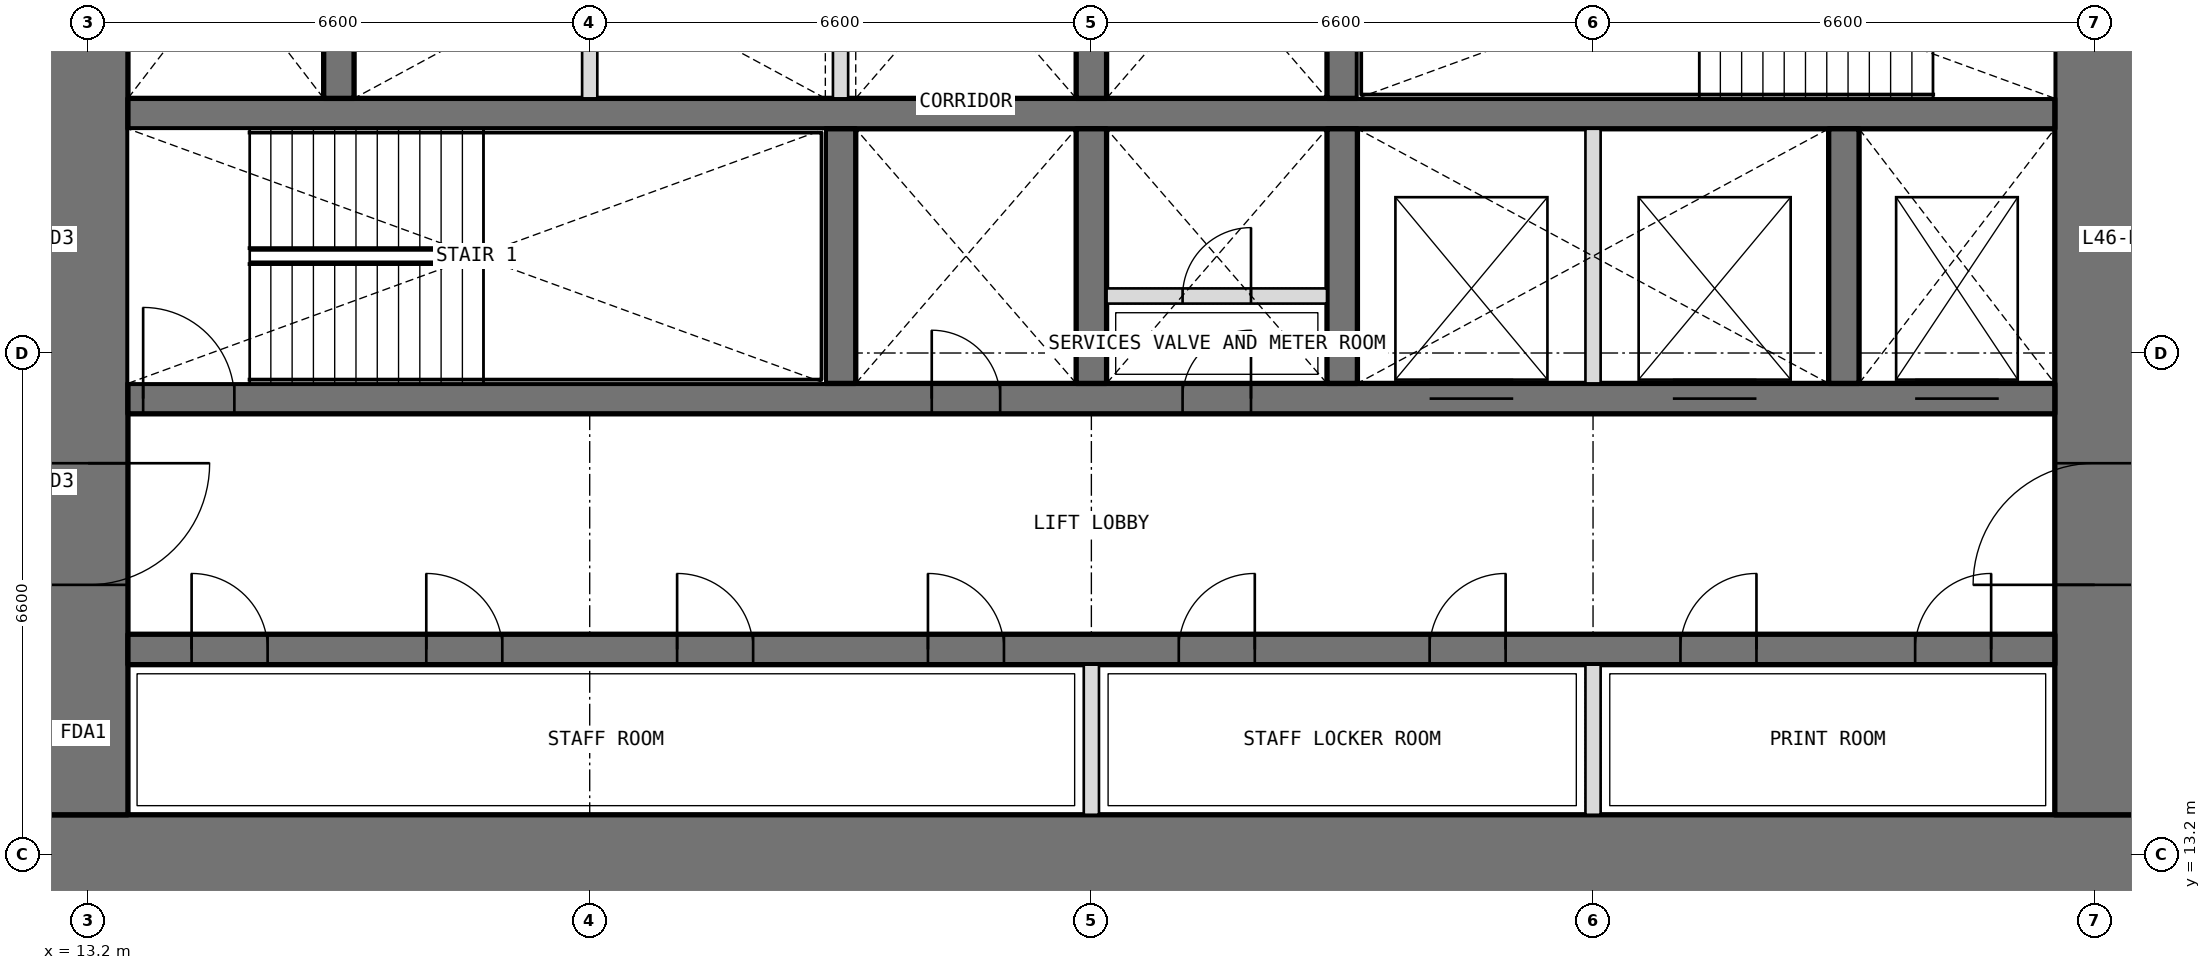
"""IFC4 building model, lengths in metres.
Left out: names, types, materials, properties, quantities, classifications, styles, units other than length and angle.
Written with IfcOpenShell. Run it as: python <this file> out.ifc"""

import sys

from ifc_helpers import new_model, si_unit, direction, frame, frame_2d, origin, place, context, subcontext, project, spatial, rectangle, extrude, element, fill, save


model = new_model("IFC4")
c1 = context("Model", 3, precision=1e-05, world=origin(), true_north=direction((0.0, 1.0)))
c2 = subcontext(c1, "Body", "Model", "MODEL_VIEW")
j1 = project(units=[si_unit("LENGTHUNIT", "METRE"), si_unit("PLANEANGLEUNIT", "RADIAN")], contexts=[c1])
p1 = place(None, origin())
s1 = spatial("IfcSite", under=j1, at=p1, CompositionType="ELEMENT")
p2 = place(p1, origin())
s2 = spatial("IfcBuilding", under=s1, at=p2, CompositionType="ELEMENT")
p3 = place(p2, frame((0.0, 0.0, 201.9)))
s3 = spatial("IfcBuildingStorey", under=s2, at=p3, CompositionType="ELEMENT", Elevation=201.9)
p4 = place(p3, frame((12.675, 13.2, 0.0), z_axis=(0.0, 0.0, 1.0), x_axis=(1.0, 0.0, 0.0)))
e1 = element("IfcWall", 1, at=p4, inside=s3, PredefinedType="SHEAR", context=c2, shape_type="SweptSolid", body=[
    extrude(rectangle(XDim=27.45, YDim=1.05, at=frame_2d((13.725, 0.0))), origin(), (0.0, 0.0, 1.0), 4.2),
])
p5 = place(p3, frame((39.6, 13.725, 0.0), z_axis=(0.0, 0.0, 1.0), x_axis=(0.0, 1.0, 0.0)))
e2 = element("IfcWall", 2, at=p5, inside=s3, PredefinedType="SHEAR", context=c2, shape_type="SweptSolid", body=[
    extrude(rectangle(XDim=18.75, YDim=1.05, at=frame_2d((9.375, 0.0))), origin(), (0.0, 0.0, 1.0), 4.2),
])
p6 = place(p5, frame((3.025, 0.0, 0.0)))
e3 = element("IfcOpeningElement", 3, at=p6, cuts=e2, PredefinedType="OPENING", context=c2, shape_type="SweptSolid", body=[
    extrude(rectangle(XDim=1.6, YDim=2.1, at=frame_2d((0.8, 1.05))), frame((0.0, 0.535, 0.0), z_axis=(0.0, -1.0, 0.0), x_axis=(1.0, 0.0, 0.0)), (0.0, 0.0, 1.0), 1.07),
])
p7 = place(p5, frame((13.825, 0.0, 0.0)))
e4 = element("IfcOpeningElement", 4, at=p7, cuts=e2, PredefinedType="OPENING", context=c2, shape_type="SweptSolid", body=[
    extrude(rectangle(XDim=1.6, YDim=2.1, at=frame_2d((0.8, 1.05))), frame((0.0, 0.535, 0.0), z_axis=(0.0, -1.0, 0.0), x_axis=(1.0, 0.0, 0.0)), (0.0, 0.0, 1.0), 1.07),
])
p8 = place(p3, frame((13.2, 32.475, 0.0), z_axis=(0.0, 0.0, 1.0), x_axis=(0.0, -1.0, 0.0)))
e5 = element("IfcWall", 5, at=p8, inside=s3, PredefinedType="SHEAR", context=c2, shape_type="SweptSolid", body=[
    extrude(rectangle(XDim=18.75, YDim=1.05, at=frame_2d((9.375, 0.0))), origin(), (0.0, 0.0, 1.0), 4.2),
])
p9 = place(p8, frame((14.125, 0.0, 0.0)))
e6 = element("IfcOpeningElement", 6, at=p9, cuts=e5, PredefinedType="OPENING", context=c2, shape_type="SweptSolid", body=[
    extrude(rectangle(XDim=1.6, YDim=2.1, at=frame_2d((0.8, 1.05))), frame((0.0, 0.535, 0.0), z_axis=(0.0, -1.0, 0.0), x_axis=(1.0, 0.0, 0.0)), (0.0, 0.0, 1.0), 1.07),
])
p10 = place(p8, frame((3.325, 0.0, 0.0)))
e7 = element("IfcOpeningElement", 7, at=p10, cuts=e5, PredefinedType="OPENING", context=c2, shape_type="SweptSolid", body=[
    extrude(rectangle(XDim=1.6, YDim=2.1, at=frame_2d((0.8, 1.05))), frame((0.0, 0.535, 0.0), z_axis=(0.0, -1.0, 0.0), x_axis=(1.0, 0.0, 0.0)), (0.0, 0.0, 1.0), 1.07),
])
p11 = place(p3, frame((13.725, 15.9, 0.0), z_axis=(0.0, 0.0, 1.0), x_axis=(1.0, 0.0, 0.0)))
e8 = element("IfcWall", 8, at=p11, inside=s3, PredefinedType="SHEAR", context=c2, shape_type="SweptSolid", body=[
    extrude(rectangle(XDim=25.35, YDim=0.4, at=frame_2d((12.675, 0.0))), origin(), (0.0, 0.0, 1.0), 4.2),
])
p12 = place(p11, frame((0.837, 0.0, 0.0)))
e9 = element("IfcOpeningElement", 9, at=p12, cuts=e8, PredefinedType="OPENING", context=c2, shape_type="SweptSolid", body=[
    extrude(rectangle(XDim=1.0, YDim=2.1, at=frame_2d((0.5, 1.05))), frame((0.0, 0.21, 0.0), z_axis=(0.0, -1.0, 0.0), x_axis=(1.0, 0.0, 0.0)), (0.0, 0.0, 1.0), 0.42),
])
p13 = place(p11, frame((3.925, 0.0, 0.0)))
e10 = element("IfcOpeningElement", 10, at=p13, cuts=e8, PredefinedType="OPENING", context=c2, shape_type="SweptSolid", body=[
    extrude(rectangle(XDim=1.0, YDim=2.1, at=frame_2d((0.5, 1.05))), frame((0.0, 0.21, 0.0), z_axis=(0.0, -1.0, 0.0), x_axis=(1.0, 0.0, 0.0)), (0.0, 0.0, 1.0), 0.42),
])
p14 = place(p11, frame((7.225, 0.0, 0.0)))
e11 = element("IfcOpeningElement", 11, at=p14, cuts=e8, PredefinedType="OPENING", context=c2, shape_type="SweptSolid", body=[
    extrude(rectangle(XDim=1.0, YDim=2.1, at=frame_2d((0.5, 1.05))), frame((0.0, 0.21, 0.0), z_axis=(0.0, -1.0, 0.0), x_axis=(1.0, 0.0, 0.0)), (0.0, 0.0, 1.0), 0.42),
])
p15 = place(p11, frame((10.525, 0.0, 0.0)))
e12 = element("IfcOpeningElement", 12, at=p15, cuts=e8, PredefinedType="OPENING", context=c2, shape_type="SweptSolid", body=[
    extrude(rectangle(XDim=1.0, YDim=2.1, at=frame_2d((0.5, 1.05))), frame((0.0, 0.21, 0.0), z_axis=(0.0, -1.0, 0.0), x_axis=(1.0, 0.0, 0.0)), (0.0, 0.0, 1.0), 0.42),
])
p16 = place(p11, frame((13.825, 0.0, 0.0)))
e13 = element("IfcOpeningElement", 13, at=p16, cuts=e8, PredefinedType="OPENING", context=c2, shape_type="SweptSolid", body=[
    extrude(rectangle(XDim=1.0, YDim=2.1, at=frame_2d((0.5, 1.05))), frame((0.0, 0.21, 0.0), z_axis=(0.0, -1.0, 0.0), x_axis=(1.0, 0.0, 0.0)), (0.0, 0.0, 1.0), 0.42),
])
p17 = place(p11, frame((17.125, 0.0, 0.0)))
e14 = element("IfcOpeningElement", 14, at=p17, cuts=e8, PredefinedType="OPENING", context=c2, shape_type="SweptSolid", body=[
    extrude(rectangle(XDim=1.0, YDim=2.1, at=frame_2d((0.5, 1.05))), frame((0.0, 0.21, 0.0), z_axis=(0.0, -1.0, 0.0), x_axis=(1.0, 0.0, 0.0)), (0.0, 0.0, 1.0), 0.42),
])
p18 = place(p11, frame((20.425, 0.0, 0.0)))
e15 = element("IfcOpeningElement", 15, at=p18, cuts=e8, PredefinedType="OPENING", context=c2, shape_type="SweptSolid", body=[
    extrude(rectangle(XDim=1.0, YDim=2.1, at=frame_2d((0.5, 1.05))), frame((0.0, 0.21, 0.0), z_axis=(0.0, -1.0, 0.0), x_axis=(1.0, 0.0, 0.0)), (0.0, 0.0, 1.0), 0.42),
])
p19 = place(p11, frame((23.512, 0.0, 0.0)))
e16 = element("IfcOpeningElement", 16, at=p19, cuts=e8, PredefinedType="OPENING", context=c2, shape_type="SweptSolid", body=[
    extrude(rectangle(XDim=1.0, YDim=2.1, at=frame_2d((0.5, 1.05))), frame((0.0, 0.21, 0.0), z_axis=(0.0, -1.0, 0.0), x_axis=(1.0, 0.0, 0.0)), (0.0, 0.0, 1.0), 0.42),
])
p20 = place(p3, frame((13.725, 19.2, 0.0), z_axis=(0.0, 0.0, 1.0), x_axis=(1.0, 0.0, 0.0)))
e17 = element("IfcWall", 17, at=p20, inside=s3, PredefinedType="SHEAR", context=c2, shape_type="SweptSolid", body=[
    extrude(rectangle(XDim=25.35, YDim=0.4, at=frame_2d((12.675, 0.0))), origin(), (0.0, 0.0, 1.0), 4.2),
])
p21 = place(p20, frame((10.575, 0.0, 0.0)))
e18 = element("IfcOpeningElement", 18, at=p21, cuts=e17, PredefinedType="OPENING", context=c2, shape_type="SweptSolid", body=[
    extrude(rectangle(XDim=0.9, YDim=2.1, at=frame_2d((0.45, 1.05))), frame((0.0, 0.21, 0.0), z_axis=(0.0, -1.0, 0.0), x_axis=(1.0, 0.0, 0.0)), (0.0, 0.0, 1.0), 0.42),
])
p22 = place(p20, frame((13.875, 0.0, 0.0)))
e19 = element("IfcOpeningElement", 19, at=p22, cuts=e17, PredefinedType="OPENING", context=c2, shape_type="SweptSolid", body=[
    extrude(rectangle(XDim=0.9, YDim=2.1, at=frame_2d((0.45, 1.05))), frame((0.0, 0.21, 0.0), z_axis=(0.0, -1.0, 0.0), x_axis=(1.0, 0.0, 0.0)), (0.0, 0.0, 1.0), 0.42),
])
p23 = place(p20, frame((0.2, 0.0, 0.0)))
e20 = element("IfcOpeningElement", 20, at=p23, cuts=e17, PredefinedType="OPENING", context=c2, shape_type="SweptSolid", body=[
    extrude(rectangle(XDim=1.2, YDim=2.1, at=frame_2d((0.6, 1.05))), frame((0.0, 0.21, 0.0), z_axis=(0.0, -1.0, 0.0), x_axis=(1.0, 0.0, 0.0)), (0.0, 0.0, 1.0), 0.42),
])
p24 = place(p20, frame((23.512, 0.0, 0.0)))
e21 = element("IfcOpeningElement", 21, at=p24, cuts=e17, PredefinedType="OPENING", context=c2, shape_type="SweptSolid", body=[
    extrude(rectangle(XDim=1.1, YDim=2.1, at=frame_2d((0.55, 1.05))), frame((0.0, 0.21, 0.0), z_axis=(0.0, -1.0, 0.0), x_axis=(1.0, 0.0, 0.0)), (0.0, 0.0, 1.0), 0.42),
])
p25 = place(p20, frame((17.125, 0.0, 0.0)))
e22 = element("IfcOpeningElement", 22, at=p25, cuts=e17, PredefinedType="OPENING", context=c2, shape_type="SweptSolid", body=[
    extrude(rectangle(XDim=1.1, YDim=2.1, at=frame_2d((0.55, 1.05))), frame((0.0, 0.21, 0.0), z_axis=(0.0, -1.0, 0.0), x_axis=(1.0, 0.0, 0.0)), (0.0, 0.0, 1.0), 0.42),
])
p26 = place(p20, frame((20.325, 0.0, 0.0)))
e23 = element("IfcOpeningElement", 23, at=p26, cuts=e17, PredefinedType="OPENING", context=c2, shape_type="SweptSolid", body=[
    extrude(rectangle(XDim=1.1, YDim=2.1, at=frame_2d((0.55, 1.05))), frame((0.0, 0.21, 0.0), z_axis=(0.0, -1.0, 0.0), x_axis=(1.0, 0.0, 0.0)), (0.0, 0.0, 1.0), 0.42),
])
p27 = place(p3, frame((13.725, 22.95, 0.0), z_axis=(0.0, 0.0, 1.0), x_axis=(1.0, 0.0, 0.0)))
e24 = element("IfcWall", 24, at=p27, inside=s3, PredefinedType="SHEAR", context=c2, shape_type="SweptSolid", body=[
    extrude(rectangle(XDim=25.35, YDim=0.4, at=frame_2d((12.675, 0.0))), origin(), (0.0, 0.0, 1.0), 4.2),
])
for number, where, z_axis, x_axis in (
    (25, (23.1, 19.4, 0.0), (0.0, 0.0, 1.0), (0.0, 1.0, 0.0)),
    (26, (26.4, 19.4, 0.0), (0.0, 0.0, 1.0), (0.0, 1.0, 0.0)),
    (27, (29.7, 19.4, 0.0), (0.0, 0.0, 1.0), (0.0, 1.0, 0.0)),
    (28, (36.3, 19.4, 0.0), (0.0, 0.0, 1.0), (0.0, 1.0, 0.0)),
    (29, (16.5, 23.15, 0.0), (0.0, 0.0, 1.0), (0.0, 1.0, 0.0)),
    (30, (26.4, 23.15, 0.0), (0.0, 0.0, 1.0), (0.0, 1.0, 0.0)),
    (31, (29.7, 23.15, 0.0), (0.0, 0.0, 1.0), (0.0, 1.0, 0.0)),
):
    element("IfcWall", number, at=place(p3, frame(where, z_axis=z_axis, x_axis=x_axis)), inside=s3, PredefinedType="SHEAR", context=c2, shape_type="SweptSolid", body=[
        extrude(rectangle(XDim=3.35, YDim=0.4, at=frame_2d((1.675, 0.0))), origin(), (0.0, 0.0, 1.0), 4.2),
    ])
for number, where, z_axis, x_axis in (
    (32, (26.4, 13.725, 0.0), (0.0, 0.0, 1.0), (0.0, 1.0, 0.0)),
    (33, (33.0, 13.725, 0.0), (0.0, 0.0, 1.0), (0.0, 1.0, 0.0)),
):
    element("IfcWall", number, at=place(p3, frame(where, z_axis=z_axis, x_axis=x_axis)), inside=s3, PredefinedType="PARTITIONING", context=c2, shape_type="SweptSolid", body=[
        extrude(rectangle(XDim=1.975, YDim=0.2, at=frame_2d((0.987, 0.0))), origin(), (0.0, 0.0, 1.0), 4.2),
    ])
for number, where, z_axis, x_axis in (
    (34, (33.0, 19.4, 0.0), (0.0, 0.0, 1.0), (0.0, 1.0, 0.0)),
    (35, (19.8, 23.15, 0.0), (0.0, 0.0, 1.0), (0.0, 1.0, 0.0)),
    (36, (23.1, 23.15, 0.0), (0.0, 0.0, 1.0), (0.0, 1.0, 0.0)),
):
    element("IfcWall", number, at=place(p3, frame(where, z_axis=z_axis, x_axis=x_axis)), inside=s3, PredefinedType="PARTITIONING", context=c2, shape_type="SweptSolid", body=[
        extrude(rectangle(XDim=3.35, YDim=0.2, at=frame_2d((1.675, 0.0))), origin(), (0.0, 0.0, 1.0), 4.2),
    ])
p28 = place(p3, frame((26.6, 20.55, 0.0), z_axis=(0.0, 0.0, 1.0), x_axis=(1.0, 0.0, 0.0)))
e37 = element("IfcWall", 37, at=p28, inside=s3, PredefinedType="PARTITIONING", context=c2, shape_type="SweptSolid", body=[
    extrude(rectangle(XDim=2.9, YDim=0.2, at=frame_2d((1.45, 0.0))), origin(), (0.0, 0.0, 1.0), 3.9),
])
p29 = place(p28, frame((1.0, 0.0, 0.0)))
e38 = element("IfcOpeningElement", 38, at=p29, cuts=e37, PredefinedType="OPENING", context=c2, shape_type="SweptSolid", body=[
    extrude(rectangle(XDim=0.9, YDim=2.1, at=frame_2d((0.45, 1.05))), frame((0.0, 0.11, 0.0), z_axis=(0.0, -1.0, 0.0), x_axis=(1.0, 0.0, 0.0)), (0.0, 0.0, 1.0), 0.22),
])
p30 = place(p21, origin())
e39 = element("IfcDoor", 39, at=p30, inside=s3, OperationType="SINGLE_SWING_LEFT", PredefinedType="DOOR", context=c2, shape_type="SweptSolid", body=[
    extrude(rectangle(XDim=0.9, YDim=2.1, at=frame_2d((0.45, 1.05))), frame((0.0, 0.025, 0.0), z_axis=(0.0, -1.0, 0.0), x_axis=(1.0, 0.0, 0.0)), (0.0, 0.0, 1.0), 0.05),
])
fill(e18, e39)
p31 = place(p22, origin())
e40 = element("IfcDoor", 40, at=p31, inside=s3, OperationType="SINGLE_SWING_RIGHT", PredefinedType="DOOR", context=c2, shape_type="SweptSolid", body=[
    extrude(rectangle(XDim=0.9, YDim=2.1, at=frame_2d((0.45, 1.05))), frame((0.0, 0.025, 0.0), z_axis=(0.0, -1.0, 0.0), x_axis=(1.0, 0.0, 0.0)), (0.0, 0.0, 1.0), 0.05),
])
fill(e19, e40)
p32 = place(p29, origin())
e41 = element("IfcDoor", 41, at=p32, inside=s3, OperationType="SINGLE_SWING_RIGHT", PredefinedType="DOOR", context=c2, shape_type="SweptSolid", body=[
    extrude(rectangle(XDim=0.9, YDim=2.1, at=frame_2d((0.45, 1.05))), frame((0.0, 0.025, 0.0), z_axis=(0.0, -1.0, 0.0), x_axis=(1.0, 0.0, 0.0)), (0.0, 0.0, 1.0), 0.05),
])
fill(e38, e41)
p33 = place(p12, origin())
e42 = element("IfcDoor", 42, at=p33, inside=s3, OperationType="SINGLE_SWING_LEFT", PredefinedType="DOOR", context=c2, shape_type="SweptSolid", body=[
    extrude(rectangle(XDim=1.0, YDim=2.1, at=frame_2d((0.5, 1.05))), frame((0.0, 0.025, 0.0), z_axis=(0.0, -1.0, 0.0), x_axis=(1.0, 0.0, 0.0)), (0.0, 0.0, 1.0), 0.05),
])
fill(e9, e42)
p34 = place(p13, origin())
e43 = element("IfcDoor", 43, at=p34, inside=s3, OperationType="SINGLE_SWING_LEFT", PredefinedType="DOOR", context=c2, shape_type="SweptSolid", body=[
    extrude(rectangle(XDim=1.0, YDim=2.1, at=frame_2d((0.5, 1.05))), frame((0.0, 0.025, 0.0), z_axis=(0.0, -1.0, 0.0), x_axis=(1.0, 0.0, 0.0)), (0.0, 0.0, 1.0), 0.05),
])
fill(e10, e43)
p35 = place(p14, origin())
e44 = element("IfcDoor", 44, at=p35, inside=s3, OperationType="SINGLE_SWING_LEFT", PredefinedType="DOOR", context=c2, shape_type="SweptSolid", body=[
    extrude(rectangle(XDim=1.0, YDim=2.1, at=frame_2d((0.5, 1.05))), frame((0.0, 0.025, 0.0), z_axis=(0.0, -1.0, 0.0), x_axis=(1.0, 0.0, 0.0)), (0.0, 0.0, 1.0), 0.05),
])
fill(e11, e44)
p36 = place(p15, origin())
e45 = element("IfcDoor", 45, at=p36, inside=s3, OperationType="SINGLE_SWING_LEFT", PredefinedType="DOOR", context=c2, shape_type="SweptSolid", body=[
    extrude(rectangle(XDim=1.0, YDim=2.1, at=frame_2d((0.5, 1.05))), frame((0.0, 0.025, 0.0), z_axis=(0.0, -1.0, 0.0), x_axis=(1.0, 0.0, 0.0)), (0.0, 0.0, 1.0), 0.05),
])
fill(e12, e45)
p37 = place(p16, origin())
e46 = element("IfcDoor", 46, at=p37, inside=s3, OperationType="SINGLE_SWING_RIGHT", PredefinedType="DOOR", context=c2, shape_type="SweptSolid", body=[
    extrude(rectangle(XDim=1.0, YDim=2.1, at=frame_2d((0.5, 1.05))), frame((0.0, 0.025, 0.0), z_axis=(0.0, -1.0, 0.0), x_axis=(1.0, 0.0, 0.0)), (0.0, 0.0, 1.0), 0.05),
])
fill(e13, e46)
p38 = place(p17, origin())
e47 = element("IfcDoor", 47, at=p38, inside=s3, OperationType="SINGLE_SWING_RIGHT", PredefinedType="DOOR", context=c2, shape_type="SweptSolid", body=[
    extrude(rectangle(XDim=1.0, YDim=2.1, at=frame_2d((0.5, 1.05))), frame((0.0, 0.025, 0.0), z_axis=(0.0, -1.0, 0.0), x_axis=(1.0, 0.0, 0.0)), (0.0, 0.0, 1.0), 0.05),
])
fill(e14, e47)
p39 = place(p18, origin())
e48 = element("IfcDoor", 48, at=p39, inside=s3, OperationType="SINGLE_SWING_RIGHT", PredefinedType="DOOR", context=c2, shape_type="SweptSolid", body=[
    extrude(rectangle(XDim=1.0, YDim=2.1, at=frame_2d((0.5, 1.05))), frame((0.0, 0.025, 0.0), z_axis=(0.0, -1.0, 0.0), x_axis=(1.0, 0.0, 0.0)), (0.0, 0.0, 1.0), 0.05),
])
fill(e15, e48)
p40 = place(p19, origin())
e49 = element("IfcDoor", 49, at=p40, inside=s3, OperationType="SINGLE_SWING_RIGHT", PredefinedType="DOOR", context=c2, shape_type="SweptSolid", body=[
    extrude(rectangle(XDim=1.0, YDim=2.1, at=frame_2d((0.5, 1.05))), frame((0.0, 0.025, 0.0), z_axis=(0.0, -1.0, 0.0), x_axis=(1.0, 0.0, 0.0)), (0.0, 0.0, 1.0), 0.05),
])
fill(e16, e49)
p41 = place(p23, origin())
e50 = element("IfcDoor", 50, at=p41, inside=s3, OperationType="SINGLE_SWING_LEFT", PredefinedType="DOOR", context=c2, shape_type="SweptSolid", body=[
    extrude(rectangle(XDim=1.2, YDim=2.1, at=frame_2d((0.6, 1.05))), frame((0.0, 0.025, 0.0), z_axis=(0.0, -1.0, 0.0), x_axis=(1.0, 0.0, 0.0)), (0.0, 0.0, 1.0), 0.05),
])
fill(e20, e50)
p42 = place(p9, origin())
e51 = element("IfcDoor", 51, at=p42, inside=s3, OperationType="DOUBLE_DOOR_DOUBLE_SWING", PredefinedType="DOOR", context=c2, shape_type="SweptSolid", body=[
    extrude(rectangle(XDim=1.6, YDim=2.1, at=frame_2d((0.8, 1.05))), frame((0.0, 0.025, 0.0), z_axis=(0.0, -1.0, 0.0), x_axis=(1.0, 0.0, 0.0)), (0.0, 0.0, 1.0), 0.05),
])
fill(e6, e51)
p43 = place(p6, origin())
e52 = element("IfcDoor", 52, at=p43, inside=s3, OperationType="DOUBLE_DOOR_DOUBLE_SWING", PredefinedType="DOOR", context=c2, shape_type="SweptSolid", body=[
    extrude(rectangle(XDim=1.6, YDim=2.1, at=frame_2d((0.8, 1.05))), frame((0.0, 0.025, 0.0), z_axis=(0.0, -1.0, 0.0), x_axis=(1.0, 0.0, 0.0)), (0.0, 0.0, 1.0), 0.05),
])
fill(e3, e52)
p44 = place(p24, origin())
e53 = element("IfcDoor", 53, at=p44, inside=s3, OperationType="DOUBLE_DOOR_SLIDING", PredefinedType="DOOR", context=c2, shape_type="SweptSolid", body=[
    extrude(rectangle(XDim=1.1, YDim=2.1, at=frame_2d((0.55, 1.05))), frame((0.0, 0.025, 0.0), z_axis=(0.0, -1.0, 0.0), x_axis=(1.0, 0.0, 0.0)), (0.0, 0.0, 1.0), 0.05),
])
fill(e21, e53)
p45 = place(p25, origin())
e54 = element("IfcDoor", 54, at=p45, inside=s3, OperationType="DOUBLE_DOOR_SLIDING", PredefinedType="DOOR", context=c2, shape_type="SweptSolid", body=[
    extrude(rectangle(XDim=1.1, YDim=2.1, at=frame_2d((0.55, 1.05))), frame((0.0, 0.025, 0.0), z_axis=(0.0, -1.0, 0.0), x_axis=(1.0, 0.0, 0.0)), (0.0, 0.0, 1.0), 0.05),
])
fill(e22, e54)
p46 = place(p26, origin())
e55 = element("IfcDoor", 55, at=p46, inside=s3, OperationType="DOUBLE_DOOR_SLIDING", PredefinedType="DOOR", context=c2, shape_type="SweptSolid", body=[
    extrude(rectangle(XDim=1.1, YDim=2.1, at=frame_2d((0.55, 1.05))), frame((0.0, 0.025, 0.0), z_axis=(0.0, -1.0, 0.0), x_axis=(1.0, 0.0, 0.0)), (0.0, 0.0, 1.0), 0.05),
])
fill(e23, e55)
save(model, sys.argv[1])
